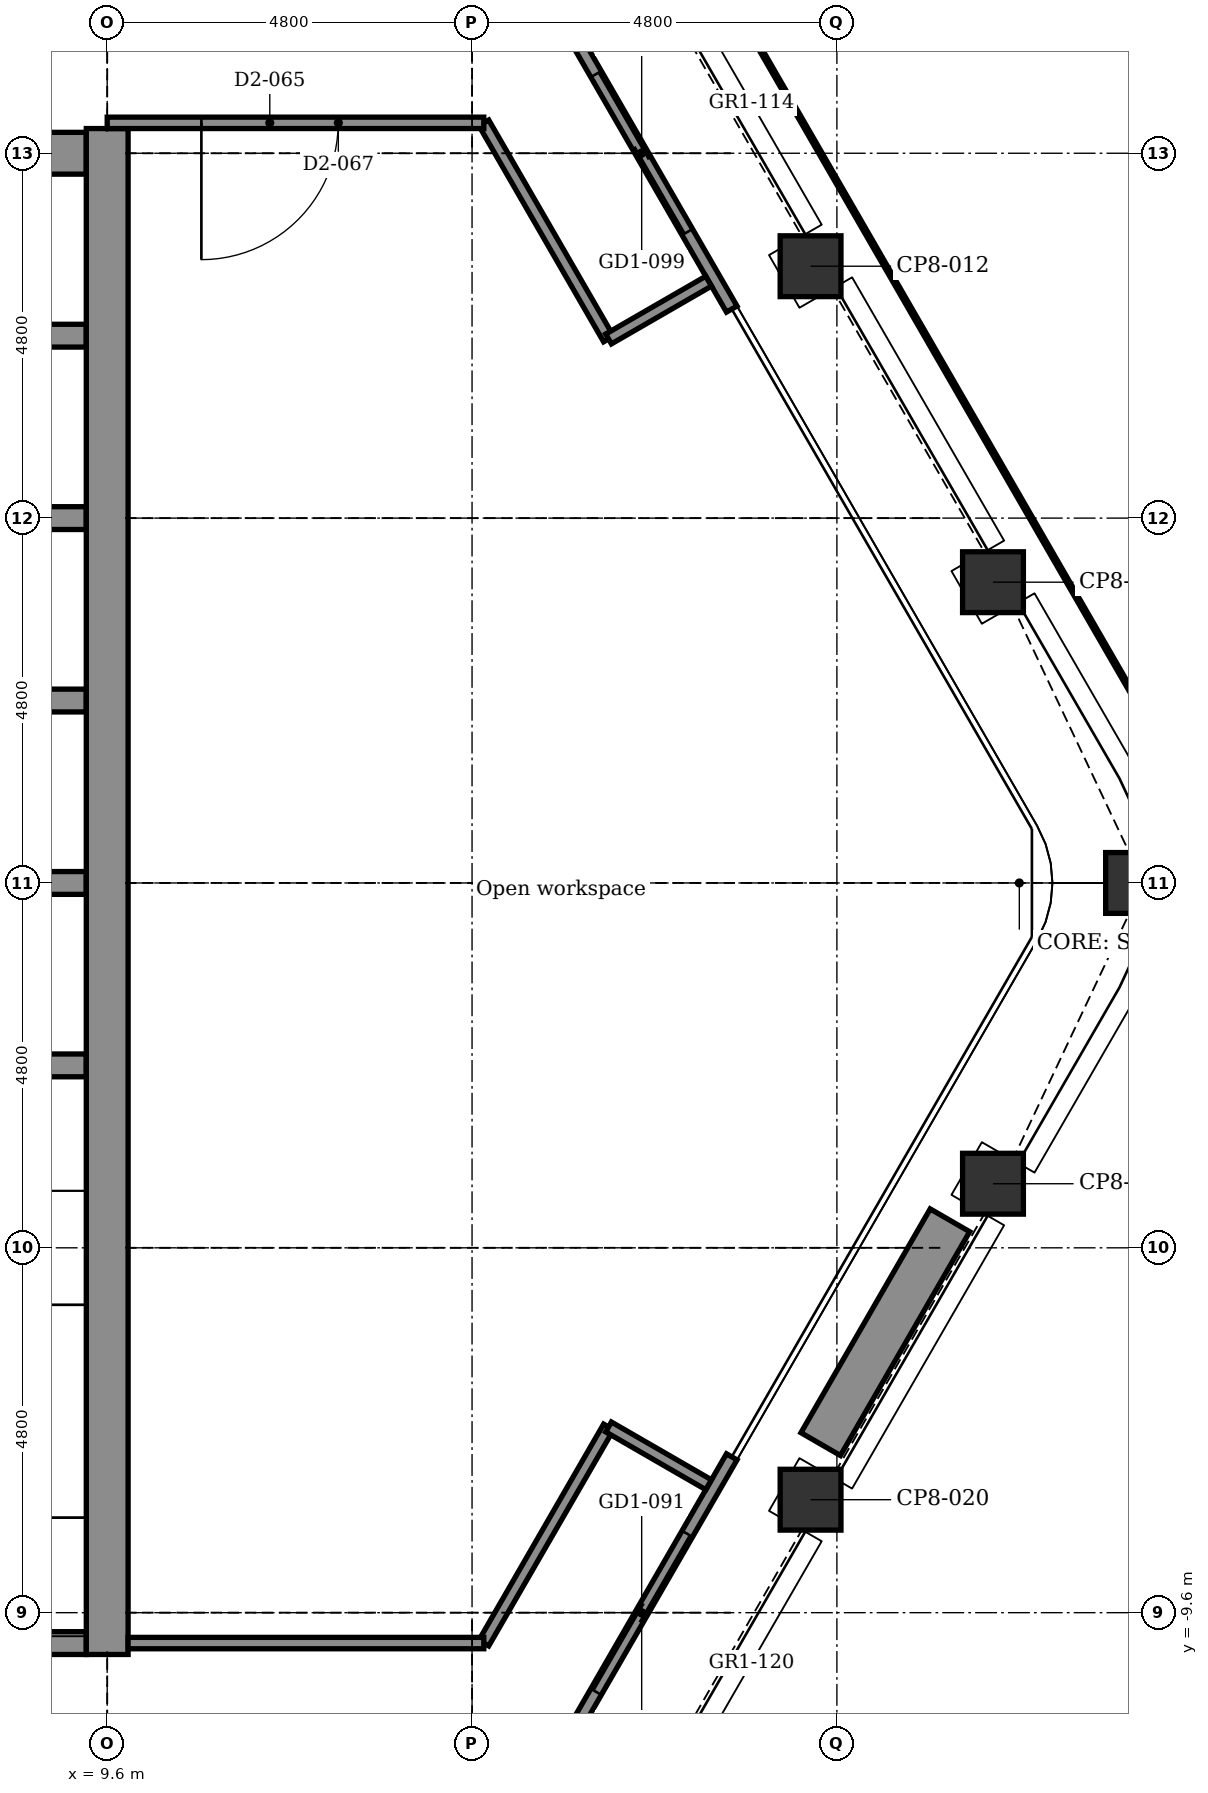
"""IFC4 building model, lengths in metres.
Left out: names, types, materials, properties, quantities, classifications, styles, units other than length and angle.
Written with IfcOpenShell. Run it as: python <this file> out.ifc"""

import sys

from ifc_helpers import new_model, si_unit, direction, frame, frame_2d, origin, origin_2d, place, context, subcontext, project, spatial, rectangle, extrude, element, fill, save


model = new_model("IFC4")
c1 = context("Model", 3, precision=1e-05, world=origin(), true_north=direction((0.0, 1.0)))
c2 = subcontext(c1, "Body", "Model", "MODEL_VIEW")
j1 = project(units=[si_unit("LENGTHUNIT", "METRE"), si_unit("PLANEANGLEUNIT", "RADIAN")], contexts=[c1])
p1 = place(None, origin())
s1 = spatial("IfcSite", under=j1, at=p1, CompositionType="ELEMENT")
p2 = place(p1, origin())
s2 = spatial("IfcBuilding", under=s1, at=p2, CompositionType="ELEMENT")
p3 = place(p2, frame((0.0, 0.0, 226.7)))
s3 = spatial("IfcBuildingStorey", under=s2, at=p3, CompositionType="ELEMENT", Elevation=226.7)
for number, where, z_axis, x_axis in (
    (1, (18.854, 8.114, -0.15), (0.0, 0.0, 1.0), (0.866, 0.5, 0.0)),
    (2, (21.254, 3.957, -0.15), (0.0, 0.0, 1.0), (0.866, 0.5, 0.0)),
    (3, (23.136, 0.0, -0.15), (0.0, 0.0, 1.0), (1.0, 0.0, 0.0)),
    (4, (21.254, -3.957, -0.15), (0.0, 0.0, 1.0), (0.5, 0.866, 0.0)),
    (5, (18.854, -8.114, -0.15), (0.0, 0.0, 1.0), (0.5, 0.866, 0.0)),
):
    element("IfcColumn", number, at=place(p3, frame(where, z_axis=z_axis, x_axis=x_axis)), inside=s3, PredefinedType="COLUMN", context=c2, shape_type="SweptSolid", body=[
        extrude(rectangle(XDim=0.8, YDim=0.8, at=origin_2d()), origin(), (0.0, 0.0, 1.0), 3.9),
    ])
p4 = place(p3, frame((4.95, -10.0, -0.15), z_axis=(0.0, 0.0, 1.0), x_axis=(1.0, 0.0, 0.0)))
e6 = element("IfcWall", 6, at=p4, inside=s3, PredefinedType="STANDARD", context=c2, shape_type="SweptSolid", body=[
    extrude(rectangle(XDim=4.375, YDim=0.3, at=frame_2d((2.188, 0.0))), origin(), (0.0, 0.0, 1.0), 3.9),
])
for number, where, z_axis, x_axis in (
    (7, (6.15, -2.4, -0.15), (0.0, 0.0, 1.0), (1.0, 0.0, 0.0)),
    (8, (6.15, 0.0, -0.15), (0.0, 0.0, 1.0), (1.0, 0.0, 0.0)),
    (9, (6.15, 2.4, -0.15), (0.0, 0.0, 1.0), (1.0, 0.0, 0.0)),
    (10, (6.15, 4.8, -0.15), (0.0, 0.0, 1.0), (1.0, 0.0, 0.0)),
):
    element("IfcWall", number, at=place(p3, frame(where, z_axis=z_axis, x_axis=x_axis)), inside=s3, PredefinedType="STANDARD", context=c2, shape_type="SweptSolid", body=[
        extrude(rectangle(XDim=3.175, YDim=0.3, at=frame_2d((1.587, 0.0))), origin(), (0.0, 0.0, 1.0), 3.9),
    ])
p5 = place(p3, frame((6.0, 7.2, -0.15), z_axis=(0.0, 0.0, 1.0), x_axis=(1.0, 0.0, 0.0)))
e11 = element("IfcWall", 11, at=p5, inside=s3, PredefinedType="STANDARD", context=c2, shape_type="SweptSolid", body=[
    extrude(rectangle(XDim=3.325, YDim=0.3, at=frame_2d((1.663, 0.0))), origin(), (0.0, 0.0, 1.0), 3.9),
])
p6 = place(p3, frame((-5.25, 9.6, -0.15), z_axis=(0.0, 0.0, 1.0), x_axis=(1.0, 0.0, 0.0)))
e12 = element("IfcWall", 12, at=p6, inside=s3, PredefinedType="SHEAR", context=c2, shape_type="SweptSolid", body=[
    extrude(rectangle(XDim=14.575, YDim=0.55, at=frame_2d((7.288, 0.0))), origin(), (0.0, 0.0, 1.0), 3.9),
])
p7 = place(p6, frame((0.6, 0.0, 0.15)))
e13 = element("IfcOpeningElement", 13, at=p7, cuts=e12, PredefinedType="OPENING", context=c2, shape_type="SweptSolid", body=[
    extrude(rectangle(XDim=0.9, YDim=2.1, at=frame_2d((0.45, 1.05))), frame((0.0, 0.285, 0.0), z_axis=(0.0, -1.0, 0.0), x_axis=(1.0, 0.0, 0.0)), (0.0, 0.0, 1.0), 0.57),
])
p8 = place(p3, frame((9.6, -10.15, -0.15), z_axis=(0.0, 0.0, 1.0), x_axis=(0.0, 1.0, 0.0)))
e14 = element("IfcWall", 14, at=p8, inside=s3, PredefinedType="SHEAR", context=c2, shape_type="SweptSolid", body=[
    extrude(rectangle(XDim=20.075, YDim=0.55, at=frame_2d((10.038, 0.0))), origin(), (0.0, 0.0, 1.0), 3.9),
])
p9 = place(p3, frame((15.447, 11.655, 0.0), z_axis=(0.0, 0.0, 1.0), x_axis=(0.499978080042, -0.866038058908, 0.0)))
e15 = element("IfcWall", 15, at=p9, inside=s3, PredefinedType="PARTITIONING", context=c2, shape_type="SweptSolid", body=[
    extrude(rectangle(XDim=4.74, YDim=0.16, at=frame_2d((2.37, 0.0))), origin(), (0.0, 0.0, 1.0), 3.75),
])
p10 = place(p9, frame((1.17, 0.0, 0.0)))
e16 = element("IfcOpeningElement", 16, at=p10, cuts=e15, PredefinedType="OPENING", context=c2, shape_type="SweptSolid", body=[
    extrude(rectangle(XDim=2.4, YDim=2.4, at=frame_2d((1.2, 1.2))), frame((0.0, 0.09, 0.0), z_axis=(0.0, -1.0, 0.0), x_axis=(1.0, 0.0, 0.0)), (0.0, 0.0, 1.0), 0.18),
])
p11 = place(p3, frame((17.817, -7.55, 0.0), z_axis=(0.0, 0.0, 1.0), x_axis=(-0.499978080042, -0.866038058908, 0.0)))
e17 = element("IfcWall", 17, at=p11, inside=s3, PredefinedType="PARTITIONING", context=c2, shape_type="SweptSolid", body=[
    extrude(rectangle(XDim=4.74, YDim=0.16, at=frame_2d((2.37, 0.0))), origin(), (0.0, 0.0, 1.0), 3.75),
])
p12 = place(p11, frame((1.17, 0.0, 0.0)))
e18 = element("IfcOpeningElement", 18, at=p12, cuts=e17, PredefinedType="OPENING", context=c2, shape_type="SweptSolid", body=[
    extrude(rectangle(XDim=2.4, YDim=2.4, at=frame_2d((1.2, 1.2))), frame((0.0, 0.09, 0.0), z_axis=(0.0, -1.0, 0.0), x_axis=(1.0, 0.0, 0.0)), (0.0, 0.0, 1.0), 0.18),
])
p13 = place(p3, frame((20.687, -4.438, 0.0), z_axis=(0.0, 0.0, 1.0), x_axis=(-0.500008388397, -0.866020560687, 0.0)))
e19 = element("IfcWall", 19, at=p13, inside=s3, PredefinedType="USERDEFINED", context=c2, shape_type="SweptSolid", body=[
    extrude(rectangle(XDim=3.4, YDim=0.6, at=frame_2d((1.7, 0.0))), origin(), (0.0, 0.0, 1.0), 0.7),
])
for number, where, z_axis, x_axis in (
    (20, (14.555, 10.0, 0.0), (0.0, 0.0, 1.0), (0.5, -0.866, 0.0)),
    (21, (14.555, -10.0, 0.0), (0.0, 0.0, 1.0), (0.5, 0.866, 0.0)),
):
    element("IfcWall", number, at=place(p3, frame(where, z_axis=z_axis, x_axis=x_axis)), inside=s3, PredefinedType="PARTITIONING", context=c2, shape_type="SweptSolid", body=[
        extrude(rectangle(XDim=3.283, YDim=0.15, at=frame_2d((1.642, 0.0))), origin(), (0.0, 0.0, 1.0), 3.75),
    ])
for number, where, z_axis, x_axis in (
    (22, (16.196, -7.157, 0.0), (0.0, 0.0, 1.0), (0.866, -0.5, 0.0)),
    (23, (16.196, 7.157, 0.0), (0.0, 0.0, 1.0), (0.866, 0.5, 0.0)),
):
    element("IfcWall", number, at=place(p3, frame(where, z_axis=z_axis, x_axis=x_axis)), inside=s3, PredefinedType="PARTITIONING", context=c2, shape_type="SweptSolid", body=[
        extrude(rectangle(XDim=1.52, YDim=0.15, at=frame_2d((0.76, 0.0))), origin(), (0.0, 0.0, 1.0), 3.75),
    ])
p14 = place(p3, frame((9.875, -10.0, 0.0), z_axis=(0.0, 0.0, 1.0), x_axis=(1.0, 0.0, 0.0)))
e24 = element("IfcWall", 24, at=p14, inside=s3, PredefinedType="PARTITIONING", context=c2, shape_type="SweptSolid", body=[
    extrude(rectangle(XDim=4.68, YDim=0.15, at=frame_2d((2.34, 0.0))), origin(), (0.0, 0.0, 1.0), 3.75),
])
p15 = place(p3, frame((9.6, 10.0, 0.0), z_axis=(0.0, 0.0, 1.0), x_axis=(1.0, 0.0, 0.0)))
e25 = element("IfcWall", 25, at=p15, inside=s3, PredefinedType="PARTITIONING", context=c2, shape_type="SweptSolid", body=[
    extrude(rectangle(XDim=4.955, YDim=0.15, at=frame_2d((2.477, 0.0))), origin(), (0.0, 0.0, 1.0), 3.75),
])
p16 = place(p15, frame((1.239, 0.0, 0.0)))
e26 = element("IfcOpeningElement", 26, at=p16, cuts=e25, PredefinedType="OPENING", context=c2, shape_type="SweptSolid", body=[
    extrude(rectangle(XDim=1.8, YDim=2.1, at=frame_2d((0.9, 1.05))), frame((0.0, 0.085, 0.0), z_axis=(0.0, -1.0, 0.0), x_axis=(1.0, 0.0, 0.0)), (0.0, 0.0, 1.0), 0.17),
])
p17 = place(p10, origin())
e27 = element("IfcDoor", 27, at=p17, inside=s3, OperationType="DOUBLE_DOOR_SLIDING", PredefinedType="DOOR", context=c2, shape_type="SweptSolid", body=[
    extrude(rectangle(XDim=2.4, YDim=2.4, at=frame_2d((1.2, 1.2))), frame((0.0, 0.025, 0.0), z_axis=(0.0, -1.0, 0.0), x_axis=(1.0, 0.0, 0.0)), (0.0, 0.0, 1.0), 0.05),
])
fill(e16, e27)
p18 = place(p12, origin())
e28 = element("IfcDoor", 28, at=p18, inside=s3, OperationType="DOUBLE_DOOR_SLIDING", PredefinedType="DOOR", context=c2, shape_type="SweptSolid", body=[
    extrude(rectangle(XDim=2.4, YDim=2.4, at=frame_2d((1.2, 1.2))), frame((0.0, 0.025, 0.0), z_axis=(0.0, -1.0, 0.0), x_axis=(1.0, 0.0, 0.0)), (0.0, 0.0, 1.0), 0.05),
])
fill(e18, e28)
p19 = place(p16, frame((1.8, 0.0, 0.0), z_axis=(0.0, 0.0, 1.0), x_axis=(-1.0, 0.0, 0.0)))
e29 = element("IfcDoor", 29, at=p19, inside=s3, OperationType="SINGLE_SWING_LEFT", PredefinedType="DOOR", context=c2, shape_type="SweptSolid", body=[
    extrude(rectangle(XDim=1.8, YDim=2.1, at=frame_2d((0.9, 1.05))), frame((0.0, 0.025, 0.0), z_axis=(0.0, -1.0, 0.0), x_axis=(1.0, 0.0, 0.0)), (0.0, 0.0, 1.0), 0.05),
])
fill(e26, e29)
save(model, sys.argv[1])
